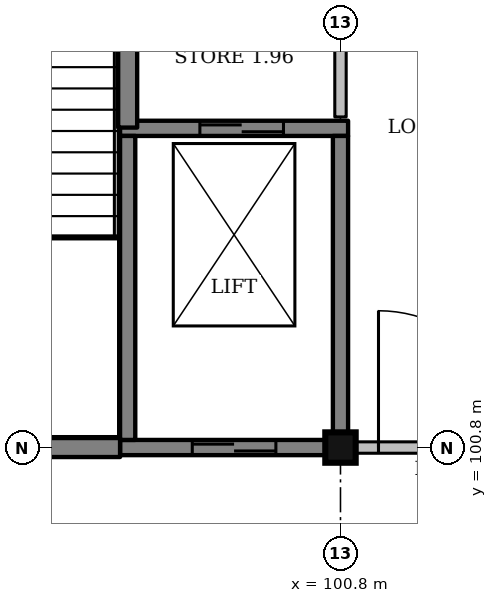
"""IFC4 building model, lengths in metres.
Left out: names, types, materials, properties, quantities, classifications, styles, units other than length and angle.
Written with IfcOpenShell. Run it as: python <this file> out.ifc"""

import sys

from ifc_helpers import new_model, si_unit, direction, frame, frame_2d, origin, origin_2d, place, context, subcontext, project, spatial, rectangle, extrude, element, fill, save


model = new_model("IFC4")
c1 = context("Model", 3, precision=1e-05, world=origin(), true_north=direction((0.0, 1.0)))
c2 = subcontext(c1, "Body", "Model", "MODEL_VIEW")
j1 = project(units=[si_unit("LENGTHUNIT", "METRE"), si_unit("PLANEANGLEUNIT", "RADIAN")], contexts=[c1])
p1 = place(None, origin())
s1 = spatial("IfcSite", under=j1, at=p1, CompositionType="ELEMENT")
p2 = place(p1, origin())
s2 = spatial("IfcBuilding", under=s1, at=p2, CompositionType="ELEMENT")
p3 = place(p2, frame((0.0, 0.0, 4.5)))
s3 = spatial("IfcBuildingStorey", under=s2, at=p3, CompositionType="ELEMENT", Elevation=4.5)
p4 = place(p3, frame((100.8, 100.8, -1.5), z_axis=(0.0, 0.0, 1.0), x_axis=(1.0, 0.0, 0.0)))
e1 = element("IfcColumn", 1, at=p4, inside=s3, PredefinedType="COLUMN", context=c2, shape_type="SweptSolid", body=[
    extrude(rectangle(XDim=0.4, YDim=0.4, at=origin_2d()), origin(), (0.0, 0.0, 1.0), 6.0),
])
p5 = place(p3, frame((97.9, 100.8, 0.0), z_axis=(0.0, 0.0, 1.0), x_axis=(1.0, 0.0, 0.0)))
e2 = element("IfcWall", 2, at=p5, inside=s3, PredefinedType="SHEAR", context=c2, shape_type="SweptSolid", body=[
    extrude(rectangle(XDim=2.7, YDim=0.2, at=frame_2d((1.35, 0.0))), origin(), (0.0, 0.0, 1.0), 4.5),
])
p6 = place(p5, frame((0.95, 0.0, 0.0)))
e3 = element("IfcOpeningElement", 3, at=p6, cuts=e2, PredefinedType="OPENING", context=c2, shape_type="SweptSolid", body=[
    extrude(rectangle(XDim=1.1, YDim=2.1, at=frame_2d((0.55, 1.05))), frame((0.0, 0.11, 0.0), z_axis=(0.0, -1.0, 0.0), x_axis=(1.0, 0.0, 0.0)), (0.0, 0.0, 1.0), 0.22),
])
p7 = place(p3, frame((97.9, 105.0, 0.0), z_axis=(0.0, 0.0, 1.0), x_axis=(1.0, 0.0, 0.0)))
e4 = element("IfcWall", 4, at=p7, inside=s3, PredefinedType="SHEAR", context=c2, shape_type="SweptSolid", body=[
    extrude(rectangle(XDim=3.0, YDim=0.2, at=frame_2d((1.5, 0.0))), origin(), (0.0, 0.0, 1.0), 4.5),
])
p8 = place(p7, frame((1.05, 0.0, 0.0)))
e5 = element("IfcOpeningElement", 5, at=p8, cuts=e4, PredefinedType="OPENING", context=c2, shape_type="SweptSolid", body=[
    extrude(rectangle(XDim=1.1, YDim=2.1, at=frame_2d((0.55, 1.05))), frame((0.0, 0.11, 0.0), z_axis=(0.0, -1.0, 0.0), x_axis=(1.0, 0.0, 0.0)), (0.0, 0.0, 1.0), 0.22),
])
p9 = place(p3, frame((98.0, 100.9, 0.0), z_axis=(0.0, 0.0, 1.0), x_axis=(0.0, 1.0, 0.0)))
e6 = element("IfcWall", 6, at=p9, inside=s3, PredefinedType="SHEAR", context=c2, shape_type="SweptSolid", body=[
    extrude(rectangle(XDim=4.0, YDim=0.2, at=frame_2d((2.0, 0.0))), origin(), (0.0, 0.0, 1.0), 4.5),
])
p10 = place(p3, frame((100.8, 101.0, 0.0), z_axis=(0.0, 0.0, 1.0), x_axis=(0.0, 1.0, 0.0)))
e7 = element("IfcWall", 7, at=p10, inside=s3, PredefinedType="SHEAR", context=c2, shape_type="SweptSolid", body=[
    extrude(rectangle(XDim=3.9, YDim=0.2, at=frame_2d((1.95, 0.0))), origin(), (0.0, 0.0, 1.0), 4.5),
])
p11 = place(p3, frame((92.6, 100.8, 0.0), z_axis=(0.0, 0.0, 1.0), x_axis=(1.0, 0.0, 0.0)))
e8 = element("IfcWall", 8, at=p11, inside=s3, PredefinedType="SHEAR", context=c2, shape_type="SweptSolid", body=[
    extrude(rectangle(XDim=5.3, YDim=0.25, at=frame_2d((2.65, 0.0))), origin(), (0.0, 0.0, 1.0), 4.5),
])
p12 = place(p3, frame((98.0, 105.01, 0.0), z_axis=(0.0, 0.0, 1.0), x_axis=(0.0, 1.0, 0.0)))
e9 = element("IfcWall", 9, at=p12, inside=s3, PredefinedType="SHEAR", context=c2, shape_type="SweptSolid", body=[
    extrude(rectangle(XDim=4.065, YDim=0.25, at=frame_2d((2.032, 0.0))), origin(), (0.0, 0.0, 1.0), 4.5),
])
p13 = place(p12, frame((2.465, 0.0, 0.0)))
e10 = element("IfcOpeningElement", 10, at=p13, cuts=e9, PredefinedType="OPENING", context=c2, shape_type="SweptSolid", body=[
    extrude(rectangle(XDim=1.0, YDim=2.1, at=frame_2d((0.5, 1.05))), frame((0.0, 0.135, 0.0), z_axis=(0.0, -1.0, 0.0), x_axis=(1.0, 0.0, 0.0)), (0.0, 0.0, 1.0), 0.27),
])
p14 = place(p3, frame((101.0, 100.8, 0.0), z_axis=(0.0, 0.0, 1.0), x_axis=(1.0, 0.0, 0.0)))
e11 = element("IfcWall", 11, at=p14, inside=s3, PredefinedType="PARTITIONING", context=c2, shape_type="SweptSolid", body=[
    extrude(rectangle(XDim=2.6, YDim=0.15, at=frame_2d((1.3, 0.0))), origin(), (0.0, 0.0, 1.0), 3.5),
])
p15 = place(p14, frame((0.3, 0.0, 0.0)))
e12 = element("IfcOpeningElement", 12, at=p15, cuts=e11, PredefinedType="OPENING", context=c2, shape_type="SweptSolid", body=[
    extrude(rectangle(XDim=1.8, YDim=2.1, at=frame_2d((0.9, 1.05))), frame((0.0, 0.085, 0.0), z_axis=(0.0, -1.0, 0.0), x_axis=(1.0, 0.0, 0.0)), (0.0, 0.0, 1.0), 0.17),
])
p16 = place(p3, frame((100.8, 105.15, 0.0), z_axis=(0.0, 0.0, 1.0), x_axis=(0.0, 1.0, 0.0)))
e13 = element("IfcWall", 13, at=p16, inside=s3, PredefinedType="PARTITIONING", context=c2, shape_type="SweptSolid", body=[
    extrude(rectangle(XDim=3.825, YDim=0.15, at=frame_2d((1.913, 0.0))), origin(), (0.0, 0.0, 1.0), 3.65),
])
p17 = place(p16, frame((1.35, 0.0, 0.0)))
e14 = element("IfcOpeningElement", 14, at=p17, cuts=e13, PredefinedType="OPENING", context=c2, shape_type="SweptSolid", body=[
    extrude(rectangle(XDim=0.9, YDim=2.1, at=frame_2d((0.45, 1.05))), frame((0.0, 0.085, 0.0), z_axis=(0.0, -1.0, 0.0), x_axis=(1.0, 0.0, 0.0)), (0.0, 0.0, 1.0), 0.17),
])
p18 = place(p15, origin())
e15 = element("IfcDoor", 15, at=p18, inside=s3, OperationType="DOUBLE_DOOR_SINGLE_SWING", PredefinedType="DOOR", context=c2, shape_type="SweptSolid", body=[
    extrude(rectangle(XDim=1.8, YDim=2.1, at=frame_2d((0.9, 1.05))), frame((0.0, 0.025, 0.0), z_axis=(0.0, -1.0, 0.0), x_axis=(1.0, 0.0, 0.0)), (0.0, 0.0, 1.0), 0.05),
])
fill(e12, e15)
p19 = place(p6, origin())
e16 = element("IfcDoor", 16, at=p19, inside=s3, OperationType="SLIDING_TO_RIGHT", PredefinedType="DOOR", context=c2, shape_type="SweptSolid", body=[
    extrude(rectangle(XDim=1.1, YDim=2.1, at=frame_2d((0.55, 1.05))), frame((0.0, 0.025, 0.0), z_axis=(0.0, -1.0, 0.0), x_axis=(1.0, 0.0, 0.0)), (0.0, 0.0, 1.0), 0.05),
])
fill(e3, e16)
p20 = place(p8, origin())
e17 = element("IfcDoor", 17, at=p20, inside=s3, OperationType="SLIDING_TO_LEFT", PredefinedType="DOOR", context=c2, shape_type="SweptSolid", body=[
    extrude(rectangle(XDim=1.1, YDim=2.1, at=frame_2d((0.55, 1.05))), frame((0.0, 0.025, 0.0), z_axis=(0.0, -1.0, 0.0), x_axis=(1.0, 0.0, 0.0)), (0.0, 0.0, 1.0), 0.05),
])
fill(e5, e17)
save(model, sys.argv[1])
